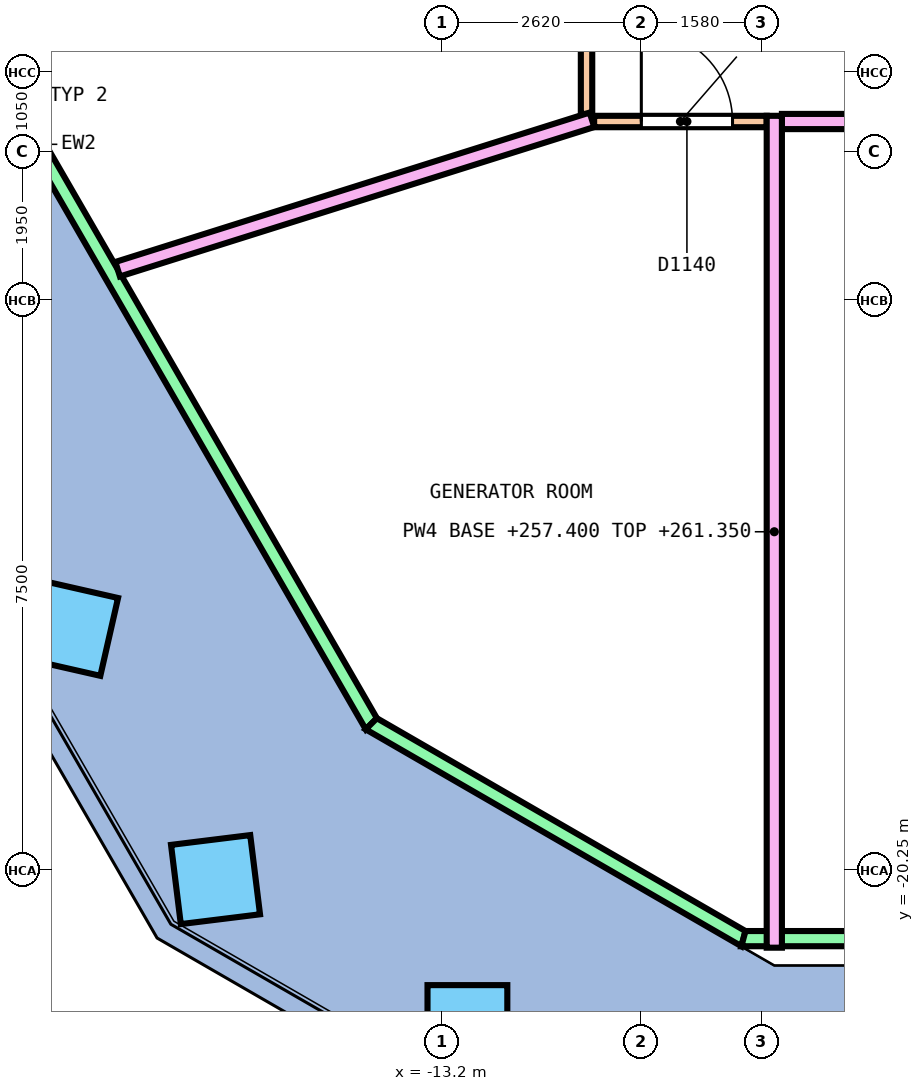
"""IFC4 building model, lengths in metres.
Left out: names, types, materials, properties, quantities, classifications, styles, units other than length and angle.
Written with IfcOpenShell. Run it as: python <this file> out.ifc"""

import sys

from ifc_helpers import new_model, si_unit, direction, frame, frame_2d, origin, origin_2d, place, context, subcontext, project, spatial, polyline, rectangle, outline, extrude, element, fill, save


model = new_model("IFC4")
c1 = context("Model", 3, precision=1e-05, world=origin(), true_north=direction((0.0, 1.0)))
c2 = subcontext(c1, "Body", "Model", "MODEL_VIEW")
j1 = project(units=[si_unit("LENGTHUNIT", "METRE"), si_unit("PLANEANGLEUNIT", "RADIAN")], contexts=[c1])
p1 = place(None, origin())
s1 = spatial("IfcSite", under=j1, at=p1, CompositionType="ELEMENT")
p2 = place(p1, origin())
s2 = spatial("IfcBuilding", under=s1, at=p2, CompositionType="ELEMENT")
p3 = place(p2, frame((0.0, 0.0, 257.4)))
s3 = spatial("IfcBuildingStorey", under=s2, at=p3, CompositionType="ELEMENT", Elevation=257.4)
p4 = place(p3, frame((-20.002, -13.755, 0.0), z_axis=(0.307414246375, 0.212821923446, 0.927471460492), x_axis=(0.509630689758, -0.859924314794, 0.028403043537)))
e1 = element("IfcColumn", 1, at=p4, inside=s3, PredefinedType="COLUMN", context=c2, shape_type="SweptSolid", body=[
    extrude(rectangle(XDim=1.05, YDim=1.05, at=origin_2d()), origin(), (0.0, 0.0, 1.0), 5.65),
])
p5 = place(p3, frame((-18.092, -17.064, 0.0), z_axis=(0.275786736896, 0.26485170237, 0.924010417422), x_axis=(0.527422463379, -0.845351815419, 0.084887297584)))
e2 = element("IfcColumn", 2, at=p5, inside=s3, PredefinedType="COLUMN", context=c2, shape_type="SweptSolid", body=[
    extrude(rectangle(XDim=1.05, YDim=1.05, at=origin_2d()), origin(), (0.0, 0.0, 1.0), 5.671),
])
p6 = place(p3, frame((-16.181, -20.373, 0.0), z_axis=(0.243460244821, 0.315340204763, 0.917217348534), x_axis=(0.854296945705, -0.51748495249, -0.048847236419)))
e3 = element("IfcColumn", 3, at=p6, inside=s3, PredefinedType="COLUMN", context=c2, shape_type="SweptSolid", body=[
    extrude(rectangle(XDim=1.05, YDim=1.05, at=origin_2d()), origin(), (0.0, 0.0, 1.0), 5.713),
])
p7 = place(p3, frame((-12.867, -22.287, 0.0), z_axis=(0.19767286417, 0.342407574416, 0.918521905973), x_axis=(0.866046396646, -0.499963637527, -2.760204e-06)))
e4 = element("IfcColumn", 4, at=p7, inside=s3, PredefinedType="COLUMN", context=c2, shape_type="SweptSolid", body=[
    extrude(rectangle(XDim=1.05, YDim=1.05, at=origin_2d()), origin(), (0.0, 0.0, 1.0), 5.705),
])
p8 = place(p3, frame((-9.553, -24.2, 0.0), z_axis=(0.151364824905, 0.368540443247, 0.917205882816), x_axis=(0.98847796626, -0.056433833436, -0.140451175369)))
e5 = element("IfcColumn", 5, at=p8, inside=s3, PredefinedType="COLUMN", context=c2, shape_type="SweptSolid", body=[
    extrude(rectangle(XDim=1.05, YDim=1.05, at=origin_2d()), origin(), (0.0, 0.0, 1.0), 5.713),
])
p9 = place(p3, frame((-22.934, -3.076, 0.0), z_axis=(0.0, 0.0, 1.0), x_axis=(0.499992938033, -0.866029480975, 0.0)))
e6 = element("IfcWall", 6, at=p9, inside=s3, PredefinedType="SOLIDWALL", context=c2, shape_type="SweptSolid", body=[
    extrude(outline(polyline([(-0.027, -0.1), (17.633, -0.1), (17.579, 0.1), (0.027, 0.1), (-0.027, -0.1)])), origin(), (0.0, 0.0, 1.0), 3.95),
])
p10 = place(p3, frame((-14.132, -18.323, 0.0), z_axis=(0.0, 0.0, 1.0), x_axis=(0.866036716508, -0.499980405277, 0.0)))
e7 = element("IfcWall", 7, at=p10, inside=s3, PredefinedType="SOLIDWALL", context=c2, shape_type="SweptSolid", body=[
    extrude(outline(polyline([(-0.027, -0.1), (5.68, -0.1), (5.626, 0.1), (0.027, 0.1), (-0.027, -0.1)])), origin(), (0.0, 0.0, 1.0), 3.95),
])
p11 = place(p3, frame((-9.236, -21.15, 0.0), z_axis=(0.0, 0.0, 1.0), x_axis=(1.0, 0.0, 0.0)))
e8 = element("IfcWall", 8, at=p11, inside=s3, PredefinedType="SOLIDWALL", context=c2, shape_type="SweptSolid", body=[
    extrude(outline(polyline([(-0.027, -0.1), (18.499, -0.1), (18.445, 0.1), (0.027, 0.1), (-0.027, -0.1)])), origin(), (0.0, 0.0, 1.0), 3.95),
])
p12 = place(p11, frame((8.636, 0.0, 0.0)))
e9 = element("IfcOpeningElement", 9, at=p12, cuts=e8, PredefinedType="OPENING", context=c2, shape_type="SweptSolid", body=[
    extrude(rectangle(XDim=1.2, YDim=2.1, at=frame_2d((0.6, 1.05))), frame((0.0, 0.11, 0.0), z_axis=(0.0, -1.0, 0.0), x_axis=(1.0, 0.0, 0.0)), (0.0, 0.0, 1.0), 0.22),
])
p13 = place(p3, frame((-11.3, -10.3, 0.0), z_axis=(0.0, 0.0, 1.0), x_axis=(0.0, 1.0, 0.0)))
e10 = element("IfcWall", 10, at=p13, inside=s3, PredefinedType="PARTITIONING", context=c2, shape_type="SweptSolid", body=[
    extrude(rectangle(XDim=4.414, YDim=0.15, at=frame_2d((2.207, 0.0))), origin(), (0.0, 0.0, 1.0), 4.5),
])
p14 = place(p13, frame((0.928, 0.0, 0.0)))
e11 = element("IfcOpeningElement", 11, at=p14, cuts=e10, PredefinedType="OPENING", context=c2, shape_type="SweptSolid", body=[
    extrude(rectangle(XDim=1.2, YDim=2.1, at=frame_2d((0.6, 1.05))), frame((0.0, 0.085, 0.0), z_axis=(0.0, -1.0, 0.0), x_axis=(1.0, 0.0, 0.0)), (0.0, 0.0, 1.0), 0.17),
])
p15 = place(p3, frame((-11.2, -10.4, 0.0), z_axis=(0.0, 0.0, 1.0), x_axis=(1.0, 0.0, 0.0)))
e12 = element("IfcWall", 12, at=p15, inside=s3, PredefinedType="PARTITIONING", context=c2, shape_type="SweptSolid", body=[
    extrude(rectangle(XDim=2.27, YDim=0.15, at=frame_2d((1.135, 0.0))), origin(), (0.0, 0.0, 1.0), 4.5),
])
p16 = place(p15, frame((0.621, 0.0, 0.0)))
e13 = element("IfcOpeningElement", 13, at=p16, cuts=e12, PredefinedType="OPENING", context=c2, shape_type="SweptSolid", body=[
    extrude(rectangle(XDim=1.2, YDim=2.1, at=frame_2d((0.6, 1.05))), frame((0.0, 0.085, 0.0), z_axis=(0.0, -1.0, 0.0), x_axis=(1.0, 0.0, 0.0)), (0.0, 0.0, 1.0), 0.17),
])
p17 = place(p3, frame((-8.73, -10.4, 0.0), z_axis=(0.0, 0.0, 1.0), x_axis=(1.0, 0.0, 0.0)))
e14 = element("IfcWall", 14, at=p17, inside=s3, PredefinedType="PARTITIONING", context=c2, shape_type="SweptSolid", body=[
    extrude(rectangle(XDim=6.719, YDim=0.2, at=frame_2d((3.36, 0.0))), origin(), (0.0, 0.0, 1.0), 4.5),
])
p18 = place(p17, frame((2.007, 0.0, 0.0)))
e15 = element("IfcOpeningElement", 15, at=p18, cuts=e14, PredefinedType="OPENING", context=c2, shape_type="SweptSolid", body=[
    extrude(rectangle(XDim=1.2, YDim=2.1, at=frame_2d((0.6, 1.05))), frame((0.0, 0.11, 0.0), z_axis=(0.0, -1.0, 0.0), x_axis=(1.0, 0.0, 0.0)), (0.0, 0.0, 1.0), 0.22),
])
p19 = place(p3, frame((-8.83, -21.269, 0.0), z_axis=(0.0, 0.0, 1.0), x_axis=(0.0, 1.0, 0.0)))
e16 = element("IfcWall", 16, at=p19, inside=s3, PredefinedType="PARTITIONING", context=c2, shape_type="SweptSolid", body=[
    extrude(rectangle(XDim=10.944, YDim=0.2, at=frame_2d((5.472, 0.0))), origin(), (0.0, 0.0, 1.0), 3.95),
])
p20 = place(p3, frame((-17.469, -12.343, 0.0), z_axis=(0.0, 0.0, 1.0), x_axis=(0.95380292302, 0.300432994258, 0.0)))
e17 = element("IfcWall", 17, at=p20, inside=s3, PredefinedType="PARTITIONING", context=c2, shape_type="SweptSolid", body=[
    extrude(rectangle(XDim=6.542, YDim=0.2, at=frame_2d((3.271, 0.0))), origin(), (0.0, 0.0, 1.0), 4.5),
])
p21 = place(p16, origin())
e18 = element("IfcDoor", 18, at=p21, inside=s3, OperationType="DOUBLE_DOOR_SINGLE_SWING", PredefinedType="DOOR", context=c2, shape_type="SweptSolid", body=[
    extrude(rectangle(XDim=1.2, YDim=2.1, at=frame_2d((0.6, 1.05))), frame((0.0, 0.025, 0.0), z_axis=(0.0, -1.0, 0.0), x_axis=(1.0, 0.0, 0.0)), (0.0, 0.0, 1.0), 0.05),
])
fill(e13, e18)
save(model, sys.argv[1])
